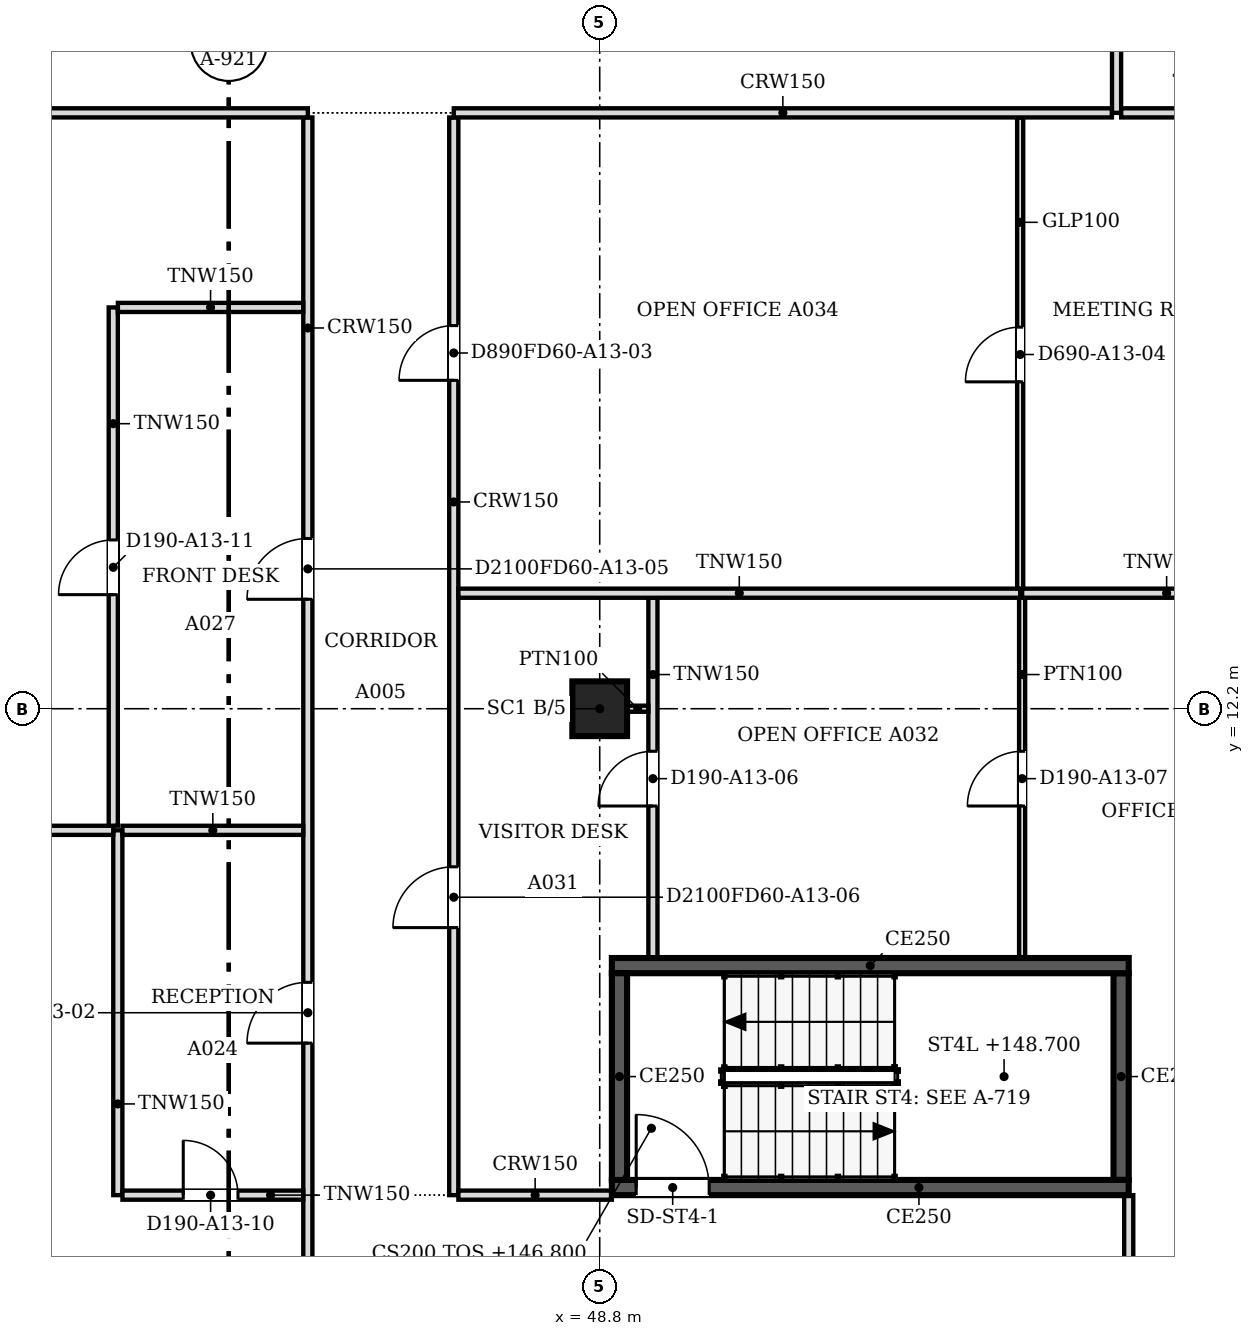
"""IFC4 building model, lengths in metres.
Left out: names, types, materials, properties, quantities, classifications, styles, units other than length and angle.
Written with IfcOpenShell. Run it as: python <this file> out.ifc"""

import sys

from ifc_helpers import new_model, si_unit, direction, frame, frame_2d, origin, origin_2d, place, context, subcontext, project, spatial, polyline, rectangle, outline, extrude, faceted_brep, source, transform, mapped, element, fill, save


model = new_model("IFC4")
c1 = context("Model", 3, precision=1e-05, world=origin(), true_north=direction((0.0, 1.0)))
c2 = subcontext(c1, "Body", "Model", "MODEL_VIEW")
j1 = project(units=[si_unit("LENGTHUNIT", "METRE"), si_unit("PLANEANGLEUNIT", "RADIAN")], contexts=[c1])
p1 = place(None, origin())
s1 = spatial("IfcSite", under=j1, at=p1, CompositionType="ELEMENT")
p2 = place(p1, origin())
s2 = spatial("IfcBuilding", under=s1, at=p2, CompositionType="ELEMENT")
p3 = place(p2, frame((0.0, 0.0, 146.8)))
s3 = spatial("IfcBuildingStorey", under=s2, at=p3, CompositionType="ELEMENT", Elevation=146.8)
p4 = place(p3, frame((48.8, 12.2, 0.0), z_axis=(0.0, 0.0, 1.0), x_axis=(1.0, 0.0, 0.0)))
e1 = element("IfcColumn", 1, at=p4, inside=s3, PredefinedType="COLUMN", context=c2, shape_type="SweptSolid", body=[
    extrude(rectangle(XDim=0.9, YDim=0.9, at=origin_2d()), origin(), (0.0, 0.0, 1.0), 3.5),
])
m1 = source(origin(), c2, "Body", "Brep", [
    faceted_brep([(0.053, -0.25, 0.0), (2.997, -0.25, 3.8), (0.053, -0.25, 7.6), (0.0, -0.25, 7.532), (0.0, -0.25, 0.068), (0.106, 0.25, 7.532), (2.944, 0.25, 3.868), (2.944, 0.25, 3.732), (0.106, 0.25, 0.068), (2.997, 0.0, 3.8), (0.053, 0.0, 0.0), (0.053, 0.0, 7.6)], [[[0, 1, 2, 3, 4]], [[5, 6, 7, 8]], [[8, 7, 9, 1, 0, 10]], [[6, 5, 11, 2, 1, 9]], [[3, 2, 11]], [[10, 0, 4]], [[8, 10, 4, 3, 11, 5]], [[9, 7, 6]]]),
])
p5 = place(p3, frame((57.569, 1.274, -3.8), z_axis=(0.0, 0.0, 1.0), x_axis=(0.707066050402, 0.707147509625, 0.0)))
e2 = element("IfcWall", 2, at=p5, inside=s3, PredefinedType="SOLIDWALL", context=c2, shape_type="MappedRepresentation", body=[
    mapped(m1, transform((0.0, 0.0, 0.0), scale=1.0)),
])
m2 = source(origin(), c2, "Body", "SweptSolid", [
    extrude(outline(polyline([(0.253, 0.666), (2.681, 3.8), (0.253, 6.934), (0.253, 0.666)])), frame((0.0, 0.26, 0.0), z_axis=(0.0, -1.0, 0.0), x_axis=(1.0, 0.0, 0.0)), (0.0, 0.0, 1.0), 0.52),
])
p6 = place(p5, origin())
e3 = element("IfcOpeningElement", 3, at=p6, cuts=e2, PredefinedType="OPENING", context=c2, shape_type="MappedRepresentation", body=[
    mapped(m2, transform((0.0, 0.0, 0.0), scale=1.0)),
])
m3 = source(origin(), c2, "Body", "Brep", [
    faceted_brep([(2.944, -0.25, 0.0), (2.997, -0.25, 0.068), (2.997, -0.25, 3.8), (0.0, -0.25, 3.8), (0.053, 0.25, 3.8), (2.891, 0.25, 3.8), (2.891, 0.25, 0.068), (0.053, 0.25, 3.732), (2.944, 0.0, 0.0), (0.0, 0.0, 3.8)], [[[0, 1, 2, 3]], [[4, 5, 6, 7]], [[1, 0, 8]], [[5, 4, 9, 3, 2]], [[7, 6, 8, 0, 3, 9]], [[7, 9, 4]], [[1, 8, 6, 5, 2]]]),
])
p7 = place(p3, frame((57.606, 1.312, 0.0), z_axis=(0.0, 0.0, 1.0), x_axis=(0.707147509625, 0.707066050402, 0.0)))
e4 = element("IfcWall", 4, at=p7, inside=s3, PredefinedType="SOLIDWALL", context=c2, shape_type="MappedRepresentation", body=[
    mapped(m3, transform((0.0, 0.0, 0.0), scale=1.0)),
])
m4 = source(origin(), c2, "Body", "SweptSolid", [
    extrude(outline(polyline([(2.744, 3.55), (0.51, 3.55), (2.744, 0.666), (2.744, 3.55)])), frame((0.0, 0.26, 0.0), z_axis=(0.0, -1.0, 0.0), x_axis=(1.0, 0.0, 0.0)), (0.0, 0.0, 1.0), 0.52),
])
p8 = place(p7, origin())
e5 = element("IfcOpeningElement", 5, at=p8, cuts=e4, PredefinedType="OPENING", context=c2, shape_type="MappedRepresentation", body=[
    mapped(m4, transform((0.0, 0.0, 0.0), scale=1.0)),
])
p9 = place(p3, frame((57.5, 4.325, 0.0), z_axis=(0.0, 0.0, 1.0), x_axis=(-1.0, 0.0, 0.0)))
e6 = element("IfcWall", 6, at=p9, inside=s3, PredefinedType="SOLIDWALL", context=c2, shape_type="SweptSolid", body=[
    extrude(rectangle(XDim=8.5, YDim=0.25, at=frame_2d((4.25, 0.0))), origin(), (0.0, 0.0, 1.0), 3.8),
])
m5 = source(origin(), c2, "Body", "SweptSolid", [
    extrude(rectangle(XDim=1.2, YDim=2.1, at=frame_2d((0.6, 1.05))), frame((0.0, 0.135, 0.0), z_axis=(0.0, -1.0, 0.0), x_axis=(1.0, 0.0, 0.0)), (0.0, 0.0, 1.0), 0.27),
])
p10 = place(p9, frame((6.9, 0.0, 0.0)))
e7 = element("IfcOpeningElement", 7, at=p10, cuts=e6, PredefinedType="OPENING", context=c2, shape_type="MappedRepresentation", body=[
    mapped(m5, transform((0.0, 0.0, 0.0), scale=1.0)),
])
p11 = place(p3, frame((49.125, 4.45, 0.0), z_axis=(0.0, 0.0, 1.0), x_axis=(0.0, 1.0, 0.0)))
e8 = element("IfcWall", 8, at=p11, inside=s3, PredefinedType="SOLIDWALL", context=c2, shape_type="SweptSolid", body=[
    extrude(rectangle(XDim=3.4, YDim=0.25, at=frame_2d((1.7, 0.0))), origin(), (0.0, 0.0, 1.0), 3.8),
])
p12 = place(p3, frame((49.0, 7.975, 0.0), z_axis=(0.0, 0.0, 1.0), x_axis=(1.0, 0.0, 0.0)))
e9 = element("IfcWall", 9, at=p12, inside=s3, PredefinedType="SOLIDWALL", context=c2, shape_type="SweptSolid", body=[
    extrude(rectangle(XDim=8.5, YDim=0.25, at=frame_2d((4.25, 0.0))), origin(), (0.0, 0.0, 1.0), 3.8),
])
p13 = place(p3, frame((57.375, 7.85, 0.0), z_axis=(0.0, 0.0, 1.0), x_axis=(0.0, -1.0, 0.0)))
e10 = element("IfcWall", 10, at=p13, inside=s3, PredefinedType="SOLIDWALL", context=c2, shape_type="SweptSolid", body=[
    extrude(rectangle(XDim=3.4, YDim=0.25, at=frame_2d((1.7, 0.0))), origin(), (0.0, 0.0, 1.0), 3.8),
])
p14 = place(p3, frame((44.0, 0.5, 0.0), z_axis=(0.0, 0.0, 1.0), x_axis=(0.0, 1.0, 0.0)))
e11 = element("IfcWall", 11, at=p14, inside=s3, PredefinedType="PARTITIONING", context=c2, shape_type="SweptSolid", body=[
    extrude(rectangle(XDim=21.424, YDim=0.15, at=frame_2d((10.712, 0.0))), origin(), (0.0, 0.0, 1.0), 2.888),
])
m6 = source(origin(), c2, "Body", "SweptSolid", [
    extrude(rectangle(XDim=1.0, YDim=2.1, at=frame_2d((0.5, 1.05))), frame((0.0, 0.085, 0.0), z_axis=(0.0, -1.0, 0.0), x_axis=(1.0, 0.0, 0.0)), (0.0, 0.0, 1.0), 0.17),
])
p15 = place(p14, frame((6.2, 0.0, 0.0)))
e12 = element("IfcOpeningElement", 12, at=p15, cuts=e11, PredefinedType="OPENING", context=c2, shape_type="MappedRepresentation", body=[
    mapped(m6, transform((0.0, 0.0, 0.0), scale=1.0)),
])
p16 = place(p14, frame((13.5, 0.0, 0.0)))
e13 = element("IfcOpeningElement", 13, at=p16, cuts=e11, PredefinedType="OPENING", context=c2, shape_type="MappedRepresentation", body=[
    mapped(m6, transform((0.0, 0.0, 0.0), scale=1.0)),
])
p17 = place(p3, frame((57.5, 1.559, 0.0), z_axis=(0.0, 0.0, 1.0), x_axis=(0.0, 1.0, 0.0)))
e14 = element("IfcWall", 14, at=p17, inside=s3, PredefinedType="PARTITIONING", context=c2, shape_type="SweptSolid", body=[
    extrude(rectangle(XDim=2.641, YDim=0.15, at=frame_2d((1.32, 0.0))), origin(), (0.0, 0.0, 1.0), 2.888),
])
p18 = place(p3, frame((40.875, 4.2, 0.0), z_axis=(0.0, 0.0, 1.0), x_axis=(0.0, 1.0, 0.0)))
e15 = element("IfcWall", 15, at=p18, inside=s3, PredefinedType="PARTITIONING", context=c2, shape_type="SweptSolid", body=[
    extrude(rectangle(XDim=6.0, YDim=0.15, at=frame_2d((3.0, 0.0))), origin(), (0.0, 0.0, 1.0), 2.888),
])
p19 = place(p3, frame((43.924, 4.2, 0.0), z_axis=(0.0, 0.0, 1.0), x_axis=(-1.0, 0.0, 0.0)))
e16 = element("IfcWall", 16, at=p19, inside=s3, PredefinedType="PARTITIONING", context=c2, shape_type="SweptSolid", body=[
    extrude(rectangle(XDim=2.973, YDim=0.15, at=frame_2d((1.487, 0.0))), origin(), (0.0, 0.0, 1.0), 2.888),
])
m7 = source(origin(), c2, "Body", "SweptSolid", [
    extrude(rectangle(XDim=0.9, YDim=2.1, at=frame_2d((0.45, 1.05))), frame((0.0, 0.085, 0.0), z_axis=(0.0, -1.0, 0.0), x_axis=(1.0, 0.0, 0.0)), (0.0, 0.0, 1.0), 0.17),
])
p20 = place(p19, frame((1.073, 0.0, 0.0)))
e17 = element("IfcOpeningElement", 17, at=p20, cuts=e16, PredefinedType="OPENING", context=c2, shape_type="MappedRepresentation", body=[
    mapped(m7, transform((0.0, 0.0, 0.0), scale=1.0)),
])
p21 = place(p3, frame((46.4, 21.924, 0.0), z_axis=(0.0, 0.0, 1.0), x_axis=(0.0, -1.0, 0.0)))
e18 = element("IfcWall", 18, at=p21, inside=s3, PredefinedType="PARTITIONING", context=c2, shape_type="SweptSolid", body=[
    extrude(rectangle(XDim=17.724, YDim=0.15, at=frame_2d((8.862, 0.0))), origin(), (0.0, 0.0, 1.0), 2.888),
])
p22 = place(p21, frame((3.423, 0.0, 0.0)))
e19 = element("IfcOpeningElement", 19, at=p22, cuts=e18, PredefinedType="OPENING", context=c2, shape_type="MappedRepresentation", body=[
    mapped(m7, transform((0.0, 0.0, 0.0), scale=1.0)),
])
p23 = place(p21, frame((12.324, 0.0, 0.0)))
e20 = element("IfcOpeningElement", 20, at=p23, cuts=e18, PredefinedType="OPENING", context=c2, shape_type="MappedRepresentation", body=[
    mapped(m6, transform((0.0, 0.0, 0.0), scale=1.0)),
])
p24 = place(p3, frame((46.476, 4.2, 0.0), z_axis=(0.0, 0.0, 1.0), x_axis=(1.0, 0.0, 0.0)))
e21 = element("IfcWall", 21, at=p24, inside=s3, PredefinedType="PARTITIONING", context=c2, shape_type="SweptSolid", body=[
    extrude(rectangle(XDim=2.524, YDim=0.15, at=frame_2d((1.262, 0.0))), origin(), (0.0, 0.0, 1.0), 2.888),
])
p25 = place(p3, frame((49.675, 14.024, 0.0), z_axis=(0.0, 0.0, 1.0), x_axis=(0.0, -1.0, 0.0)))
e22 = element("IfcWall", 22, at=p25, inside=s3, PredefinedType="PARTITIONING", context=c2, shape_type="SweptSolid", body=[
    extrude(rectangle(XDim=5.924, YDim=0.15, at=frame_2d((2.962, 0.0))), origin(), (0.0, 0.0, 1.0), 2.888),
])
p26 = place(p25, frame((2.524, 0.0, 0.0)))
e23 = element("IfcOpeningElement", 23, at=p26, cuts=e22, PredefinedType="OPENING", context=c2, shape_type="MappedRepresentation", body=[
    mapped(m7, transform((0.0, 0.0, 0.0), scale=1.0)),
])
p27 = place(p3, frame((55.747, 14.024, 0.0), z_axis=(0.0, 0.0, 1.0), x_axis=(0.0, -1.0, 0.0)))
e24 = element("IfcWall", 24, at=p27, inside=s3, PredefinedType="PARTITIONING", context=c2, shape_type="SweptSolid", body=[
    extrude(rectangle(XDim=5.924, YDim=0.1, at=frame_2d((2.962, 0.0))), origin(), (0.0, 0.0, 1.0), 2.888),
])
m8 = source(origin(), c2, "Body", "SweptSolid", [
    extrude(rectangle(XDim=0.9, YDim=2.1, at=frame_2d((0.45, 1.05))), frame((0.0, 0.06, 0.0), z_axis=(0.0, -1.0, 0.0), x_axis=(1.0, 0.0, 0.0)), (0.0, 0.0, 1.0), 0.12),
])
p28 = place(p27, frame((2.524, 0.0, 0.0)))
e25 = element("IfcOpeningElement", 25, at=p28, cuts=e24, PredefinedType="OPENING", context=c2, shape_type="MappedRepresentation", body=[
    mapped(m8, transform((0.0, 0.0, 0.0), scale=1.0)),
])
p29 = place(p3, frame((24.9, 10.2, 0.0), z_axis=(0.0, 0.0, 1.0), x_axis=(1.0, 0.0, 0.0)))
e26 = element("IfcWall", 26, at=p29, inside=s3, PredefinedType="PARTITIONING", context=c2, shape_type="SweptSolid", body=[
    extrude(rectangle(XDim=15.9, YDim=0.15, at=frame_2d((7.95, 0.0))), origin(), (0.0, 0.0, 1.0), 2.888),
])
p30 = place(p3, frame((40.951, 10.2, 0.0), z_axis=(0.0, 0.0, 1.0), x_axis=(1.0, 0.0, 0.0)))
e27 = element("IfcWall", 27, at=p30, inside=s3, PredefinedType="PARTITIONING", context=c2, shape_type="SweptSolid", body=[
    extrude(rectangle(XDim=2.973, YDim=0.15, at=frame_2d((1.487, 0.0))), origin(), (0.0, 0.0, 1.0), 2.888),
])
p31 = place(p3, frame((40.8, 10.276, 0.0), z_axis=(0.0, 0.0, 1.0), x_axis=(0.0, 1.0, 0.0)))
e28 = element("IfcWall", 28, at=p31, inside=s3, PredefinedType="PARTITIONING", context=c2, shape_type="SweptSolid", body=[
    extrude(rectangle(XDim=8.524, YDim=0.15, at=frame_2d((4.262, 0.0))), origin(), (0.0, 0.0, 1.0), 2.888),
])
p32 = place(p31, frame((3.8, 0.0, 0.0)))
e29 = element("IfcOpeningElement", 29, at=p32, cuts=e28, PredefinedType="OPENING", context=c2, shape_type="MappedRepresentation", body=[
    mapped(m7, transform((0.0, 0.0, 0.0), scale=1.0)),
])
p33 = place(p3, frame((49.25, 12.2, 0.0), z_axis=(0.0, 0.0, 1.0), x_axis=(1.0, 0.0, 0.0)))
e30 = element("IfcWall", 30, at=p33, inside=s3, PredefinedType="PARTITIONING", context=c2, shape_type="SweptSolid", body=[
    extrude(rectangle(XDim=0.35, YDim=0.1, at=frame_2d((0.175, 0.0))), origin(), (0.0, 0.0, 1.0), 2.888),
])
p34 = place(p3, frame((46.476, 14.1, 0.0), z_axis=(0.0, 0.0, 1.0), x_axis=(1.0, 0.0, 0.0)))
e31 = element("IfcWall", 31, at=p34, inside=s3, PredefinedType="PARTITIONING", context=c2, shape_type="SweptSolid", body=[
    extrude(rectangle(XDim=9.239, YDim=0.15, at=frame_2d((4.62, 0.0))), origin(), (0.0, 0.0, 1.0), 2.888),
])
p35 = place(p3, frame((55.747, 14.1, 0.0), z_axis=(0.0, 0.0, 1.0), x_axis=(1.0, 0.0, 0.0)))
e32 = element("IfcWall", 32, at=p35, inside=s3, PredefinedType="PARTITIONING", context=c2, shape_type="SweptSolid", body=[
    extrude(rectangle(XDim=4.753, YDim=0.15, at=frame_2d((2.376, 0.0))), origin(), (0.0, 0.0, 1.0), 2.888),
])
p36 = place(p3, frame((55.715, 21.924, 0.0), z_axis=(0.0, 0.0, 1.0), x_axis=(0.0, -1.0, 0.0)))
e33 = element("IfcWall", 33, at=p36, inside=s3, PredefinedType="PARTITIONING", context=c2, shape_type="SweptSolid", body=[
    extrude(rectangle(XDim=7.748, YDim=0.1, at=frame_2d((3.874, 0.0))), origin(), (0.0, 0.0, 1.0), 2.888),
])
p37 = place(p36, frame((3.448, 0.0, 0.0)))
e34 = element("IfcOpeningElement", 34, at=p37, cuts=e33, PredefinedType="OPENING", context=c2, shape_type="MappedRepresentation", body=[
    mapped(m8, transform((0.0, 0.0, 0.0), scale=1.0)),
])
p38 = place(p3, frame((40.876, 18.8, 0.0), z_axis=(0.0, 0.0, 1.0), x_axis=(1.0, 0.0, 0.0)))
e35 = element("IfcWall", 35, at=p38, inside=s3, PredefinedType="PARTITIONING", context=c2, shape_type="SweptSolid", body=[
    extrude(rectangle(XDim=3.048, YDim=0.15, at=frame_2d((1.524, 0.0))), origin(), (0.0, 0.0, 1.0), 2.888),
])
p39 = place(p3, frame((30.5, 22.0, 0.0), z_axis=(0.0, 0.0, 1.0), x_axis=(1.0, 0.0, 0.0)))
e36 = element("IfcWall", 36, at=p39, inside=s3, PredefinedType="PARTITIONING", context=c2, shape_type="SweptSolid", body=[
    extrude(rectangle(XDim=13.5, YDim=0.15, at=frame_2d((6.75, 0.0))), origin(), (0.0, 0.0, 1.0), 2.888),
])
p40 = place(p3, frame((46.4, 22.0, 0.0), z_axis=(0.0, 0.0, 1.0), x_axis=(1.0, 0.0, 0.0)))
e37 = element("IfcWall", 37, at=p40, inside=s3, PredefinedType="PARTITIONING", context=c2, shape_type="SweptSolid", body=[
    extrude(rectangle(XDim=10.824, YDim=0.15, at=frame_2d((5.412, 0.0))), origin(), (0.0, 0.0, 1.0), 2.888),
])
p41 = place(p3, frame((57.3, 30.6, 0.0), z_axis=(0.0, 0.0, 1.0), x_axis=(0.0, -1.0, 0.0)))
e38 = element("IfcWall", 38, at=p41, inside=s3, PredefinedType="PARTITIONING", context=c2, shape_type="SweptSolid", body=[
    extrude(rectangle(XDim=8.6, YDim=0.15, at=frame_2d((4.3, 0.0))), origin(), (0.0, 0.0, 1.0), 2.888),
])
p42 = place(p41, frame((3.9, 0.0, 0.0)))
e39 = element("IfcOpeningElement", 39, at=p42, cuts=e38, PredefinedType="OPENING", context=c2, shape_type="MappedRepresentation", body=[
    mapped(m7, transform((0.0, 0.0, 0.0), scale=1.0)),
])
p43 = place(p3, frame((57.376, 22.0, 0.0), z_axis=(0.0, 0.0, 1.0), x_axis=(1.0, 0.0, 0.0)))
e40 = element("IfcWall", 40, at=p43, inside=s3, PredefinedType="PARTITIONING", context=c2, shape_type="SweptSolid", body=[
    extrude(rectangle(XDim=3.124, YDim=0.15, at=frame_2d((1.562, 0.0))), origin(), (0.0, 0.0, 1.0), 2.888),
])
m9 = source(origin(), c2, "Body", "SweptSolid", [
    extrude(rectangle(XDim=1.2, YDim=2.1, at=frame_2d((0.6, 1.05))), frame((0.0, 0.025, 0.0), z_axis=(0.0, -1.0, 0.0), x_axis=(1.0, 0.0, 0.0)), (0.0, 0.0, 1.0), 0.05),
])
p44 = place(p10, origin())
e41 = element("IfcDoor", 41, at=p44, inside=s3, OperationType="SINGLE_SWING_RIGHT", PredefinedType="DOOR", context=c2, shape_type="MappedRepresentation", body=[
    mapped(m9, transform((0.0, 0.0, 0.0), scale=1.0)),
])
fill(e7, e41)
m10 = source(origin(), c2, "Body", "SweptSolid", [
    extrude(rectangle(XDim=0.9, YDim=2.1, at=frame_2d((0.45, 1.05))), frame((0.0, 0.025, 0.0), z_axis=(0.0, -1.0, 0.0), x_axis=(1.0, 0.0, 0.0)), (0.0, 0.0, 1.0), 0.05),
])
p45 = place(p26, origin())
e42 = element("IfcDoor", 42, at=p45, inside=s3, OperationType="SINGLE_SWING_RIGHT", PredefinedType="DOOR", context=c2, shape_type="MappedRepresentation", body=[
    mapped(m10, transform((0.0, 0.0, 0.0), scale=1.0)),
])
fill(e23, e42)
p46 = place(p28, origin())
e43 = element("IfcDoor", 43, at=p46, inside=s3, OperationType="SINGLE_SWING_RIGHT", PredefinedType="DOOR", context=c2, shape_type="MappedRepresentation", body=[
    mapped(m10, transform((0.0, 0.0, 0.0), scale=1.0)),
])
fill(e25, e43)
m11 = source(origin(), c2, "Body", "SweptSolid", [
    extrude(rectangle(XDim=1.0, YDim=2.1, at=frame_2d((0.5, 1.05))), frame((0.0, 0.025, 0.0), z_axis=(0.0, -1.0, 0.0), x_axis=(1.0, 0.0, 0.0)), (0.0, 0.0, 1.0), 0.05),
])
p47 = place(p15, origin())
e44 = element("IfcDoor", 44, at=p47, inside=s3, OperationType="SINGLE_SWING_LEFT", PredefinedType="DOOR", context=c2, shape_type="MappedRepresentation", body=[
    mapped(m11, transform((0.0, 0.0, 0.0), scale=1.0)),
])
fill(e12, e44)
p48 = place(p37, origin())
e45 = element("IfcDoor", 45, at=p48, inside=s3, OperationType="SINGLE_SWING_RIGHT", PredefinedType="DOOR", context=c2, shape_type="MappedRepresentation", body=[
    mapped(m10, transform((0.0, 0.0, 0.0), scale=1.0)),
])
fill(e34, e45)
p49 = place(p22, origin())
e46 = element("IfcDoor", 46, at=p49, inside=s3, OperationType="SINGLE_SWING_RIGHT", PredefinedType="DOOR", context=c2, shape_type="MappedRepresentation", body=[
    mapped(m10, transform((0.0, 0.0, 0.0), scale=1.0)),
])
fill(e19, e46)
p50 = place(p16, origin())
e47 = element("IfcDoor", 47, at=p50, inside=s3, OperationType="SINGLE_SWING_LEFT", PredefinedType="DOOR", context=c2, shape_type="MappedRepresentation", body=[
    mapped(m11, transform((0.0, 0.0, 0.0), scale=1.0)),
])
fill(e13, e47)
p51 = place(p20, origin())
e48 = element("IfcDoor", 48, at=p51, inside=s3, OperationType="SINGLE_SWING_RIGHT", PredefinedType="DOOR", context=c2, shape_type="MappedRepresentation", body=[
    mapped(m10, transform((0.0, 0.0, 0.0), scale=1.0)),
])
fill(e17, e48)
p52 = place(p23, origin())
e49 = element("IfcDoor", 49, at=p52, inside=s3, OperationType="SINGLE_SWING_RIGHT", PredefinedType="DOOR", context=c2, shape_type="MappedRepresentation", body=[
    mapped(m11, transform((0.0, 0.0, 0.0), scale=1.0)),
])
fill(e20, e49)
p53 = place(p32, origin())
e50 = element("IfcDoor", 50, at=p53, inside=s3, OperationType="SINGLE_SWING_LEFT", PredefinedType="DOOR", context=c2, shape_type="MappedRepresentation", body=[
    mapped(m10, transform((0.0, 0.0, 0.0), scale=1.0)),
])
fill(e29, e50)
save(model, sys.argv[1])
